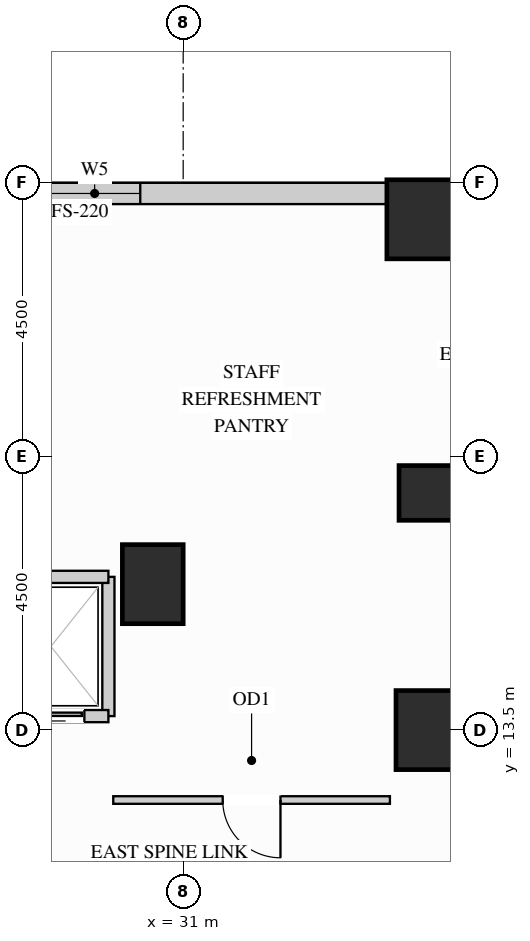
"""IFC4 building model, lengths in metres.
Left out: names, types, materials, properties, quantities, classifications, styles, units other than length and angle.
Written with IfcOpenShell. Run it as: python <this file> out.ifc"""

import sys

from ifc_helpers import new_model, si_unit, direction, frame, frame_2d, origin, origin_2d, place, context, subcontext, project, spatial, rectangle, extrude, source, transform, mapped, element, fill, save


model = new_model("IFC4")
c1 = context("Model", 3, precision=1e-05, world=origin(), true_north=direction((0.0, 1.0)))
c2 = subcontext(c1, "Body", "Model", "MODEL_VIEW")
j1 = project(units=[si_unit("LENGTHUNIT", "METRE"), si_unit("PLANEANGLEUNIT", "RADIAN")], contexts=[c1])
p1 = place(None, origin())
s1 = spatial("IfcSite", under=j1, at=p1, CompositionType="ELEMENT")
p2 = place(p1, origin())
s2 = spatial("IfcBuilding", under=s1, at=p2, CompositionType="ELEMENT")
p3 = place(p2, frame((0.0, 0.0, 54.9)))
s3 = spatial("IfcBuildingStorey", under=s2, at=p3, CompositionType="ELEMENT", Elevation=54.9)
m1 = source(origin(), c2, "Body", "SweptSolid", [
    extrude(rectangle(XDim=0.9, YDim=0.9, at=origin_2d()), origin(), (0.0, 0.0, 1.0), 3.38),
])
p4 = place(p3, frame((35.0, 17.4, 0.0), z_axis=(0.0, 0.0, 1.0), x_axis=(1.0, 0.0, 0.0)))
e1 = element("IfcColumn", 1, at=p4, inside=s3, PredefinedType="COLUMN", context=c2, shape_type="MappedRepresentation", body=[
    mapped(m1, transform((0.0, 0.0, 0.0), x_axis=(1.0, 0.0, 0.0), y_axis=(0.0, 1.0, 0.0), z_axis=(0.0, 0.0, 1.0))),
])
m2 = source(origin(), c2, "Body", "SweptSolid", [
    extrude(rectangle(XDim=1.0, YDim=1.3, at=origin_2d()), origin(), (0.0, 0.0, 1.0), 3.38),
])
for number, where, z_axis, x_axis in (
    (2, (35.0, 13.5, 0.0), (0.0, 0.0, 1.0), (1.0, 0.0, 0.0)),
    (3, (30.5, 15.9, 0.0), (0.0, 0.0, 1.0), (1.0, 0.0, 0.0)),
):
    element("IfcColumn", number, at=place(p3, frame(where, z_axis=z_axis, x_axis=x_axis)), inside=s3, PredefinedType="COLUMN", context=c2, shape_type="MappedRepresentation", body=[
        mapped(m2, transform((0.0, 0.0, 0.0), x_axis=(1.0, 0.0, 0.0), y_axis=(0.0, 1.0, 0.0), z_axis=(0.0, 0.0, 1.0))),
    ])
m3 = source(origin(), c2, "Body", "SweptSolid", [
    extrude(rectangle(XDim=1.3, YDim=1.3, at=origin_2d()), origin(), (0.0, 0.0, 1.0), 3.38),
])
p5 = place(p3, frame((35.0, 21.9, 0.0), z_axis=(0.0, 0.0, 1.0), x_axis=(1.0, 0.0, 0.0)))
e4 = element("IfcColumn", 4, at=p5, inside=s3, PredefinedType="COLUMN", context=c2, shape_type="MappedRepresentation", body=[
    mapped(m3, transform((0.0, 0.0, 0.0), x_axis=(1.0, 0.0, 0.0), y_axis=(0.0, 1.0, 0.0), z_axis=(0.0, 0.0, 1.0))),
])
p6 = place(p3, frame((34.352, 22.325, 0.0), z_axis=(0.0, 0.0, 1.0), x_axis=(-1.0, 0.0, 0.0)))
e5 = element("IfcWall", 5, at=p6, inside=s3, PredefinedType="SOLIDWALL", context=c2, shape_type="SweptSolid", body=[
    extrude(rectangle(XDim=14.854, YDim=0.35, at=frame_2d((7.427, 0.0))), origin(), (0.0, 0.0, 1.0), 3.365),
])
p7 = place(p6, frame((4.058, 0.0, 0.78)))
e6 = element("IfcOpeningElement", 6, at=p7, cuts=e5, PredefinedType="OPENING", context=c2, shape_type="SweptSolid", body=[
    extrude(rectangle(XDim=1.5, YDim=2.0, at=frame_2d((0.75, 1.0))), frame((0.0, 0.185, 0.0), z_axis=(0.0, -1.0, 0.0), x_axis=(1.0, 0.0, 0.0)), (0.0, 0.0, 1.0), 0.37),
])
p8 = place(p6, frame((9.296, 0.0, 0.78)))
e7 = element("IfcOpeningElement", 7, at=p8, cuts=e5, PredefinedType="OPENING", context=c2, shape_type="SweptSolid", body=[
    extrude(rectangle(XDim=1.5, YDim=2.0, at=frame_2d((0.75, 1.0))), frame((0.0, 0.185, 0.0), z_axis=(0.0, -1.0, 0.0), x_axis=(1.0, 0.0, 0.0)), (0.0, 0.0, 1.0), 0.37),
])
p9 = place(p3, frame((29.85, 12.35, 0.0), z_axis=(0.0, 0.0, 1.0), x_axis=(1.0, 0.0, 0.0)))
e8 = element("IfcWall", 8, at=p9, inside=s3, PredefinedType="PARTITIONING", context=c2, shape_type="SweptSolid", body=[
    extrude(rectangle(XDim=4.55, YDim=0.125, at=frame_2d((2.275, 0.0))), origin(), (0.0, 0.0, 1.0), 3.365),
])
p10 = place(p9, frame((1.8, 0.0, 0.0)))
e9 = element("IfcOpeningElement", 9, at=p10, cuts=e8, PredefinedType="OPENING", context=c2, shape_type="SweptSolid", body=[
    extrude(rectangle(XDim=0.95, YDim=2.15, at=frame_2d((0.475, 1.075))), frame((0.0, 0.073, 0.0), z_axis=(0.0, -1.0, 0.0), x_axis=(1.0, 0.0, 0.0)), (0.0, 0.0, 1.0), 0.145),
])
m4 = source(origin(), c2, "Body", "SweptSolid", [
    extrude(rectangle(XDim=2.29, YDim=0.2, at=frame_2d((1.145, 0.0))), origin(), (0.0, 0.0, 1.0), 3.365),
])
p11 = place(p3, frame((29.77, 13.73, 0.0), z_axis=(0.0, 0.0, 1.0), x_axis=(0.0, 1.0, 0.0)))
e10 = element("IfcWall", 10, at=p11, inside=s3, PredefinedType="PARTITIONING", context=c2, shape_type="MappedRepresentation", body=[
    mapped(m4, transform((0.0, 0.0, 0.0), x_axis=(1.0, 0.0, 0.0), y_axis=(0.0, 1.0, 0.0), z_axis=(0.0, 0.0, 1.0))),
])
m5 = source(origin(), c2, "Body", "SweptSolid", [
    extrude(rectangle(XDim=1.89, YDim=0.2, at=frame_2d((0.945, 0.0))), origin(), (0.0, 0.0, 1.0), 2.67),
])
p12 = place(p3, frame((27.88, 16.02, 0.0), z_axis=(0.0, 0.0, 1.0), x_axis=(1.0, 0.0, 0.0)))
e11 = element("IfcWall", 11, at=p12, inside=s3, PredefinedType="PARTITIONING", context=c2, shape_type="MappedRepresentation", body=[
    mapped(m5, transform((0.0, 0.0, 0.0), x_axis=(1.0, 0.0, 0.0), y_axis=(0.0, 1.0, 0.0), z_axis=(0.0, 0.0, 1.0))),
])
p13 = place(p3, frame((27.88, 13.73, 0.0), z_axis=(0.0, 0.0, 1.0), x_axis=(1.0, 0.0, 0.0)))
e12 = element("IfcWall", 12, at=p13, inside=s3, PredefinedType="PARTITIONING", context=c2, shape_type="SweptSolid", body=[
    extrude(rectangle(XDim=1.89, YDim=0.2, at=frame_2d((0.945, 0.0))), origin(), (0.0, 0.0, 1.0), 2.446),
])
p14 = place(p13, frame((0.395, 0.0, 0.0)))
e13 = element("IfcOpeningElement", 13, at=p14, cuts=e12, PredefinedType="OPENING", context=c2, shape_type="SweptSolid", body=[
    extrude(rectangle(XDim=1.1, YDim=2.2, at=frame_2d((0.55, 1.1))), frame((0.0, 0.11, 0.0), z_axis=(0.0, -1.0, 0.0), x_axis=(1.0, 0.0, 0.0)), (0.0, 0.0, 1.0), 0.22),
])
m6 = source(origin(), c2, "Body", "SweptSolid", [
    extrude(rectangle(XDim=1.1, YDim=2.2, at=frame_2d((0.55, 1.1))), frame((0.0, 0.025, 0.0), z_axis=(0.0, -1.0, 0.0), x_axis=(1.0, 0.0, 0.0)), (0.0, 0.0, 1.0), 0.05),
])
p15 = place(p14, origin())
e14 = element("IfcDoor", 14, at=p15, inside=s3, OperationType="SLIDING_TO_LEFT", PredefinedType="DOOR", context=c2, shape_type="MappedRepresentation", body=[
    mapped(m6, transform((0.0, 0.0, 0.0), x_axis=(1.0, 0.0, 0.0), y_axis=(0.0, 1.0, 0.0), z_axis=(0.0, 0.0, 1.0))),
])
fill(e13, e14)
m7 = source(origin(), c2, "Body", "SweptSolid", [
    extrude(rectangle(XDim=0.95, YDim=2.15, at=frame_2d((0.475, 1.075))), frame((0.0, 0.025, 0.0), z_axis=(0.0, -1.0, 0.0), x_axis=(1.0, 0.0, 0.0)), (0.0, 0.0, 1.0), 0.05),
])
p16 = place(p10, origin())
e15 = element("IfcDoor", 15, at=p16, inside=s3, OperationType="SINGLE_SWING_RIGHT", PredefinedType="DOOR", context=c2, shape_type="MappedRepresentation", body=[
    mapped(m7, transform((0.0, 0.0, 0.0), x_axis=(1.0, 0.0, 0.0), y_axis=(0.0, 1.0, 0.0), z_axis=(0.0, 0.0, 1.0))),
])
fill(e9, e15)
m8 = source(origin(), c2, "Body", "SweptSolid", [
    extrude(rectangle(XDim=1.5, YDim=2.0, at=frame_2d((0.75, 1.0))), frame((0.0, 0.03, 0.0), z_axis=(0.0, -1.0, 0.0), x_axis=(1.0, 0.0, 0.0)), (0.0, 0.0, 1.0), 0.06),
])
p17 = place(p7, origin())
e16 = element("IfcWindow", 16, at=p17, inside=s3, PartitioningType="SINGLE_PANEL", PredefinedType="WINDOW", context=c2, shape_type="MappedRepresentation", body=[
    mapped(m8, transform((0.0, 0.0, 0.0), x_axis=(1.0, 0.0, 0.0), y_axis=(0.0, 1.0, 0.0), z_axis=(0.0, 0.0, 1.0))),
])
fill(e6, e16)
save(model, sys.argv[1])
